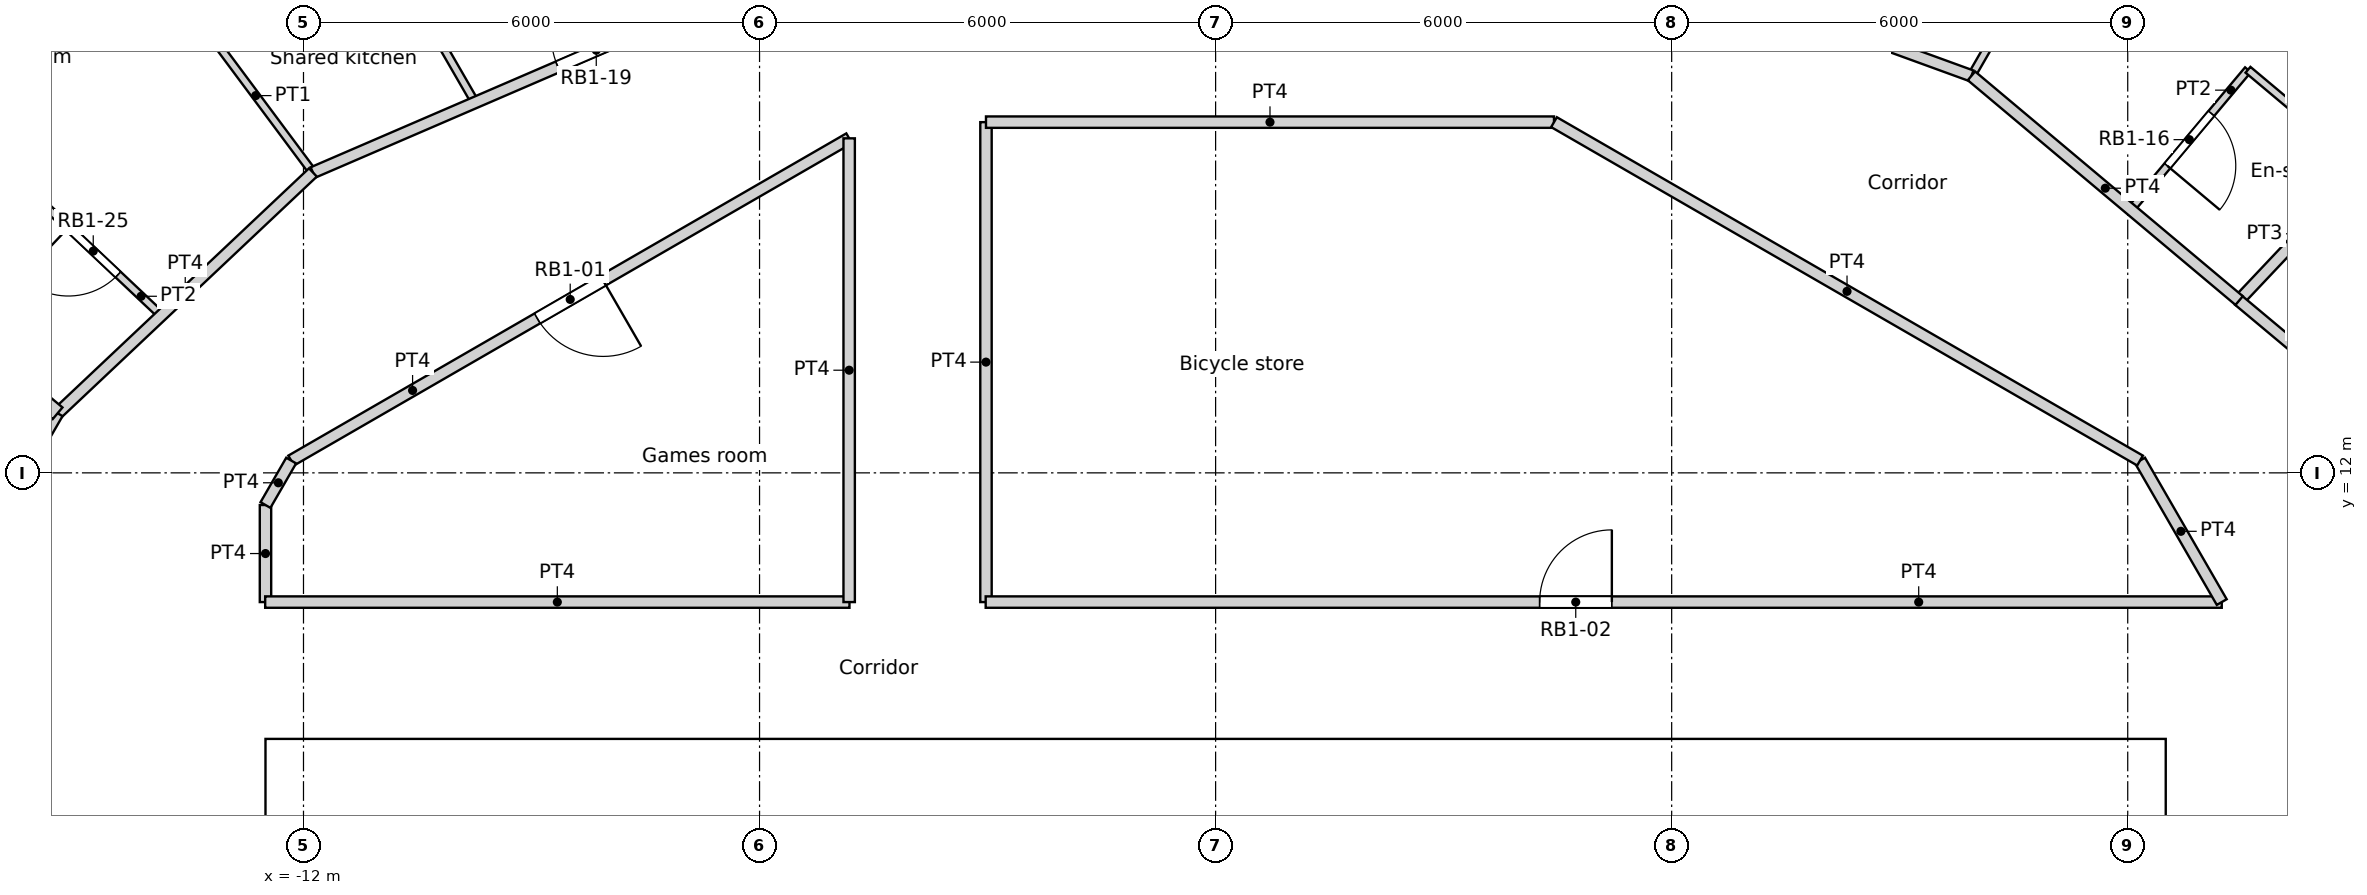
"""IFC4 building model, lengths in metres.
Left out: names, types, materials, properties, quantities, classifications, styles, units other than length and angle.
Written with IfcOpenShell. Run it as: python <this file> out.ifc"""

import sys

from ifc_helpers import new_model, si_unit, direction, frame, frame_2d, origin, origin_2d, place, context, subcontext, project, spatial, rectangle, circle, extrude, element, fill, save


model = new_model("IFC4")
c1 = context("Model", 3, precision=1e-05, world=origin(), true_north=direction((0.0, 1.0)))
c2 = subcontext(c1, "Body", "Model", "MODEL_VIEW")
j1 = project(units=[si_unit("LENGTHUNIT", "METRE"), si_unit("PLANEANGLEUNIT", "RADIAN")], contexts=[c1])
p1 = place(None, origin())
s1 = spatial("IfcSite", under=j1, at=p1, CompositionType="ELEMENT")
p2 = place(p1, origin())
s2 = spatial("IfcBuilding", under=s1, at=p2, CompositionType="ELEMENT")
p3 = place(p2, frame((0.0, 0.0, 126.0)))
s3 = spatial("IfcBuildingStorey", under=s2, at=p3, CompositionType="ELEMENT", Elevation=126.0)
for number, where, z_axis, x_axis in (
    (1, (11.735, 14.716, 0.0), (0.0, 0.0, 1.0), (1.0, 0.0, 0.0)),
    (2, (6.876, 17.521, 0.0), (0.0, 0.0, 1.0), (1.0, 0.0, 0.0)),
    (3, (-9.411, 16.301, 0.0), (0.0, 0.0, 1.0), (1.0, 0.0, 0.0)),
    (4, (-13.798, 12.802, 0.0), (0.0, 0.0, 1.0), (1.0, 0.0, 0.0)),
):
    element("IfcColumn", number, at=place(p3, frame(where, z_axis=z_axis, x_axis=x_axis)), inside=s3, PredefinedType="COLUMN", context=c2, shape_type="SweptSolid", body=[
        extrude(circle(Radius=0.65, at=origin_2d()), origin(), (0.0, 0.0, 1.0), 3.6),
    ])
p4 = place(p3, frame((-12.5, 8.05, 0.0), z_axis=(0.0, 0.0, 1.0), x_axis=(1.0, 0.0, 0.0)))
e5 = element("IfcWall", 5, at=p4, inside=s3, PredefinedType="SOLIDWALL", context=c2, shape_type="SweptSolid", body=[
    extrude(rectangle(XDim=25.0, YDim=0.9, at=frame_2d((12.5, 0.0))), origin(), (0.0, 0.0, 1.0), 3.6),
])
p5 = place(p4, frame((8.3, 0.0, 0.0)))
e6 = element("IfcOpeningElement", 6, at=p5, cuts=e5, PredefinedType="OPENING", context=c2, shape_type="SweptSolid", body=[
    extrude(rectangle(XDim=1.8, YDim=2.1, at=frame_2d((0.9, 1.05))), frame((0.0, 0.45, 0.0), z_axis=(0.0, -1.0, 0.0), x_axis=(1.0, 0.0, 0.0)), (0.0, 0.0, 1.0), 0.9),
])
p6 = place(p3, frame((-12.05, -7.6, 0.0), z_axis=(0.0, 0.0, 1.0), x_axis=(0.0, 1.0, 0.0)))
e7 = element("IfcWall", 7, at=p6, inside=s3, PredefinedType="SOLIDWALL", context=c2, shape_type="SweptSolid", body=[
    extrude(rectangle(XDim=15.2, YDim=0.9, at=frame_2d((7.6, 0.0))), origin(), (0.0, 0.0, 1.0), 3.6),
])
p7 = place(p6, frame((7.1, 0.0, 0.0)))
e8 = element("IfcOpeningElement", 8, at=p7, cuts=e7, PredefinedType="OPENING", context=c2, shape_type="SweptSolid", body=[
    extrude(rectangle(XDim=1.0, YDim=2.1, at=frame_2d((0.5, 1.05))), frame((0.0, 0.45, 0.0), z_axis=(0.0, -1.0, 0.0), x_axis=(1.0, 0.0, 0.0)), (0.0, 0.0, 1.0), 0.9),
])
p8 = place(p3, frame((12.05, -7.6, 0.0), z_axis=(0.0, 0.0, 1.0), x_axis=(0.0, 1.0, 0.0)))
e9 = element("IfcWall", 9, at=p8, inside=s3, PredefinedType="SOLIDWALL", context=c2, shape_type="SweptSolid", body=[
    extrude(rectangle(XDim=15.2, YDim=0.9, at=frame_2d((7.6, 0.0))), origin(), (0.0, 0.0, 1.0), 3.6),
])
p9 = place(p8, frame((5.1, 0.0, 0.0)))
e10 = element("IfcOpeningElement", 10, at=p9, cuts=e9, PredefinedType="OPENING", context=c2, shape_type="SweptSolid", body=[
    extrude(rectangle(XDim=1.0, YDim=2.1, at=frame_2d((0.5, 1.05))), frame((0.0, 0.45, 0.0), z_axis=(0.0, -1.0, 0.0), x_axis=(1.0, 0.0, 0.0)), (0.0, 0.0, 1.0), 0.9),
])
for number, where, z_axis, x_axis in (
    (11, (-2.25, 3.25, 0.0), (0.0, 0.0, 1.0), (0.0, 1.0, 0.0)),
    (12, (0.55, 3.25, 0.0), (0.0, 0.0, 1.0), (0.0, 1.0, 0.0)),
):
    element("IfcWall", number, at=place(p3, frame(where, z_axis=z_axis, x_axis=x_axis)), inside=s3, PredefinedType="SOLIDWALL", context=c2, shape_type="SweptSolid", body=[
        extrude(rectangle(XDim=4.35, YDim=0.3, at=frame_2d((2.175, 0.0))), origin(), (0.0, 0.0, 1.0), 3.3),
    ])
p10 = place(p3, frame((-9.05, -7.0, 0.0), z_axis=(0.0, 0.0, 1.0), x_axis=(0.0, 1.0, 0.0)))
e13 = element("IfcWall", 13, at=p10, inside=s3, PredefinedType="SOLIDWALL", context=c2, shape_type="SweptSolid", body=[
    extrude(rectangle(XDim=14.6, YDim=0.3, at=frame_2d((7.3, 0.0))), origin(), (0.0, 0.0, 1.0), 3.3),
])
p11 = place(p3, frame((-4.275, 6.7, 0.0), z_axis=(0.0, 0.0, 1.0), x_axis=(0.0, 1.0, 0.0)))
e14 = element("IfcWall", 14, at=p11, inside=s3, PredefinedType="SOLIDWALL", context=c2, shape_type="SweptSolid", body=[
    extrude(rectangle(XDim=0.9, YDim=0.15, at=frame_2d((0.45, 0.0))), origin(), (0.0, 0.0, 1.0), 3.3),
])
p12 = place(p3, frame((0.7, 7.15, 0.0), z_axis=(0.0, 0.0, 1.0), x_axis=(1.0, 0.0, 0.0)))
e15 = element("IfcWall", 15, at=p12, inside=s3, PredefinedType="SOLIDWALL", context=c2, shape_type="SweptSolid", body=[
    extrude(rectangle(XDim=8.35, YDim=0.9, at=frame_2d((4.175, 0.0))), origin(), (0.0, 0.0, 1.0), 3.3),
])
p13 = place(p3, frame((-12.504, 10.3, 0.0), z_axis=(0.0, 0.0, 1.0), x_axis=(1.0, 0.0, 0.0)))
e16 = element("IfcWall", 16, at=p13, inside=s3, PredefinedType="PARTITIONING", context=c2, shape_type="SweptSolid", body=[
    extrude(rectangle(XDim=7.687, YDim=0.15, at=frame_2d((3.844, 0.0))), origin(), (0.0, 0.0, 1.0), 3.3),
])
p14 = place(p3, frame((-3.025, 10.3, 0.0), z_axis=(0.0, 0.0, 1.0), x_axis=(1.0, 0.0, 0.0)))
e17 = element("IfcWall", 17, at=p14, inside=s3, PredefinedType="PARTITIONING", context=c2, shape_type="SweptSolid", body=[
    extrude(rectangle(XDim=16.262, YDim=0.15, at=frame_2d((8.131, 0.0))), origin(), (0.0, 0.0, 1.0), 3.3),
])
p15 = place(p14, frame((7.288, 0.0, 0.0)))
e18 = element("IfcOpeningElement", 18, at=p15, cuts=e17, PredefinedType="OPENING", context=c2, shape_type="SweptSolid", body=[
    extrude(rectangle(XDim=0.95, YDim=2.1, at=frame_2d((0.475, 1.05))), frame((0.0, 0.075, 0.0), z_axis=(0.0, -1.0, 0.0), x_axis=(1.0, 0.0, 0.0)), (0.0, 0.0, 1.0), 0.15),
])
p16 = place(p3, frame((12.162, 12.162, 0.0), z_axis=(0.0, 0.0, 1.0), x_axis=(0.499961633463, -0.866047553582, 0.0)))
e19 = element("IfcWall", 19, at=p16, inside=s3, PredefinedType="PARTITIONING", context=c2, shape_type="SweptSolid", body=[
    extrude(rectangle(XDim=2.15, YDim=0.15, at=frame_2d((1.075, 0.0))), origin(), (0.0, 0.0, 1.0), 3.3),
])
p17 = place(p3, frame((13.458, 14.27, 0.0), z_axis=(0.0, 0.0, 1.0), x_axis=(0.767079699321, -0.641551817775, 0.0)))
e20 = element("IfcWall", 20, at=p17, inside=s3, PredefinedType="PARTITIONING", context=c2, shape_type="SweptSolid", body=[
    extrude(rectangle(XDim=2.316, YDim=0.15, at=frame_2d((1.158, 0.0))), origin(), (0.0, 0.0, 1.0), 3.3),
])
p18 = place(p3, frame((-4.821, 10.3, 0.0), z_axis=(0.0, 0.0, 1.0), x_axis=(0.0, 1.0, 0.0)))
e21 = element("IfcWall", 21, at=p18, inside=s3, PredefinedType="PARTITIONING", context=c2, shape_type="SweptSolid", body=[
    extrude(rectangle(XDim=6.101, YDim=0.15, at=frame_2d((3.05, 0.0))), origin(), (0.0, 0.0, 1.0), 3.3),
])
p19 = place(p3, frame((-12.162, 12.162, 0.0), z_axis=(0.0, 0.0, 1.0), x_axis=(0.866004766557, 0.500035743023, 0.0)))
e22 = element("IfcWall", 22, at=p19, inside=s3, PredefinedType="PARTITIONING", context=c2, shape_type="SweptSolid", body=[
    extrude(rectangle(XDim=8.477, YDim=0.15, at=frame_2d((4.239, 0.0))), origin(), (0.0, 0.0, 1.0), 3.3),
])
p20 = place(p19, frame((3.739, 0.0, 0.0)))
e23 = element("IfcOpeningElement", 23, at=p20, cuts=e22, PredefinedType="OPENING", context=c2, shape_type="SweptSolid", body=[
    extrude(rectangle(XDim=1.0, YDim=2.04, at=frame_2d((0.5, 1.02))), frame((0.0, 0.075, 0.0), z_axis=(0.0, -1.0, 0.0), x_axis=(1.0, 0.0, 0.0)), (0.0, 0.0, 1.0), 0.15),
])
p21 = place(p3, frame((4.452, 16.614, 0.0), z_axis=(0.0, 0.0, 1.0), x_axis=(0.866005203721, -0.500034985904, 0.0)))
e24 = element("IfcWall", 24, at=p21, inside=s3, PredefinedType="PARTITIONING", context=c2, shape_type="SweptSolid", body=[
    extrude(rectangle(XDim=8.903, YDim=0.15, at=frame_2d((4.452, 0.0))), origin(), (0.0, 0.0, 1.0), 3.3),
])
p22 = place(p3, frame((-3.021, 16.614, 0.0), z_axis=(0.0, 0.0, 1.0), x_axis=(1.0, 0.0, 0.0)))
e25 = element("IfcWall", 25, at=p22, inside=s3, PredefinedType="PARTITIONING", context=c2, shape_type="SweptSolid", body=[
    extrude(rectangle(XDim=7.473, YDim=0.15, at=frame_2d((3.736, 0.0))), origin(), (0.0, 0.0, 1.0), 3.3),
])
p23 = place(p3, frame((-3.021, 10.3, 0.0), z_axis=(0.0, 0.0, 1.0), x_axis=(0.0, 1.0, 0.0)))
e26 = element("IfcWall", 26, at=p23, inside=s3, PredefinedType="PARTITIONING", context=c2, shape_type="SweptSolid", body=[
    extrude(rectangle(XDim=6.314, YDim=0.15, at=frame_2d((3.157, 0.0))), origin(), (0.0, 0.0, 1.0), 3.3),
])
p24 = place(p3, frame((3.453, 19.586, 0.0), z_axis=(0.0, 0.0, 1.0), x_axis=(0.939706711967, -0.341981425643, 0.0)))
e27 = element("IfcWall", 27, at=p24, inside=s3, PredefinedType="PARTITIONING", context=c2, shape_type="SweptSolid", body=[
    extrude(rectangle(XDim=6.908, YDim=0.15, at=frame_2d((3.454, 0.0))), origin(), (0.0, 0.0, 1.0), 3.3),
])
p25 = place(p24, frame((0.608, 0.0, 0.0)))
e28 = element("IfcOpeningElement", 28, at=p25, cuts=e27, PredefinedType="OPENING", context=c2, shape_type="SweptSolid", body=[
    extrude(rectangle(XDim=1.1, YDim=2.1, at=frame_2d((0.55, 1.05))), frame((0.0, 0.075, 0.0), z_axis=(0.0, -1.0, 0.0), x_axis=(1.0, 0.0, 0.0)), (0.0, 0.0, 1.0), 0.15),
])
p26 = place(p3, frame((9.944, 17.223, 0.0), z_axis=(0.0, 0.0, 1.0), x_axis=(0.765940168638, -0.642911858708, 0.0)))
e29 = element("IfcWall", 29, at=p26, inside=s3, PredefinedType="PARTITIONING", context=c2, shape_type="SweptSolid", body=[
    extrude(rectangle(XDim=4.598, YDim=0.15, at=frame_2d((2.299, 0.0))), origin(), (0.0, 0.0, 1.0), 3.3),
])
p27 = place(p3, frame((-11.876, 15.952, 0.0), z_axis=(0.0, 0.0, 1.0), x_axis=(0.918189765505, 0.396140826629, 0.0)))
e30 = element("IfcWall", 30, at=p27, inside=s3, PredefinedType="PARTITIONING", context=c2, shape_type="SweptSolid", body=[
    extrude(rectangle(XDim=9.174, YDim=0.15, at=frame_2d((4.587, 0.0))), origin(), (0.0, 0.0, 1.0), 3.3),
])
p28 = place(p27, frame((3.51, 0.0, 0.0)))
e31 = element("IfcOpeningElement", 31, at=p28, cuts=e30, PredefinedType="OPENING", context=c2, shape_type="SweptSolid", body=[
    extrude(rectangle(XDim=1.1, YDim=2.1, at=frame_2d((0.55, 1.05))), frame((0.0, 0.075, 0.0), z_axis=(0.0, -1.0, 0.0), x_axis=(1.0, 0.0, 0.0)), (0.0, 0.0, 1.0), 0.15),
])
p29 = place(p3, frame((-15.235, 12.784, 0.0), z_axis=(0.0, 0.0, 1.0), x_axis=(0.7275818654, 0.686020866403, 0.0)))
e32 = element("IfcWall", 32, at=p29, inside=s3, PredefinedType="PARTITIONING", context=c2, shape_type="SweptSolid", body=[
    extrude(rectangle(XDim=4.617, YDim=0.15, at=frame_2d((2.309, 0.0))), origin(), (0.0, 0.0, 1.0), 3.3),
])
p30 = place(p3, frame((-12.5, 11.577, 0.0), z_axis=(0.0, 0.0, 1.0), x_axis=(0.500024767483, 0.866011103799, 0.0)))
e33 = element("IfcWall", 33, at=p30, inside=s3, PredefinedType="PARTITIONING", context=c2, shape_type="SweptSolid", body=[
    extrude(rectangle(XDim=0.676, YDim=0.15, at=frame_2d((0.338, 0.0))), origin(), (0.0, 0.0, 1.0), 3.3),
])
p31 = place(p3, frame((-12.5, 10.3, 0.0), z_axis=(0.0, 0.0, 1.0), x_axis=(0.0, 1.0, 0.0)))
e34 = element("IfcWall", 34, at=p31, inside=s3, PredefinedType="PARTITIONING", context=c2, shape_type="SweptSolid", body=[
    extrude(rectangle(XDim=1.277, YDim=0.15, at=frame_2d((0.638, 0.0))), origin(), (0.0, 0.0, 1.0), 3.3),
])
p32 = place(p3, frame((-18.688, 6.802, 0.0), z_axis=(0.0, 0.0, 1.0), x_axis=(0.499914202267, 0.866074933462, 0.0)))
e35 = element("IfcWall", 35, at=p32, inside=s3, PredefinedType="PARTITIONING", context=c2, shape_type="SweptSolid", body=[
    extrude(rectangle(XDim=6.907, YDim=0.15, at=frame_2d((3.454, 0.0))), origin(), (0.0, 0.0, 1.0), 3.3),
])
p33 = place(p32, frame((3.004, 0.0, 0.0)))
e36 = element("IfcOpeningElement", 36, at=p33, cuts=e35, PredefinedType="OPENING", context=c2, shape_type="SweptSolid", body=[
    extrude(rectangle(XDim=1.5, YDim=2.1, at=frame_2d((0.75, 1.05))), frame((0.0, 0.075, 0.0), z_axis=(0.0, -1.0, 0.0), x_axis=(1.0, 0.0, 0.0)), (0.0, 0.0, 1.0), 0.15),
])
p34 = place(p3, frame((13.463, 14.27, 0.0), z_axis=(0.0, 0.0, 1.0), x_axis=(0.686486574862, 0.727142477465, 0.0)))
e37 = element("IfcWall", 37, at=p34, inside=s3, PredefinedType="PARTITIONING", context=c2, shape_type="SweptSolid", body=[
    extrude(rectangle(XDim=2.408, YDim=0.15, at=frame_2d((1.204, 0.0))), origin(), (0.0, 0.0, 1.0), 3.3),
])
p35 = place(p3, frame((9.944, 17.223, 0.0), z_axis=(0.0, 0.0, 1.0), x_axis=(0.499861334108, 0.866105447774, 0.0)))
e38 = element("IfcWall", 38, at=p35, inside=s3, PredefinedType="PARTITIONING", context=c2, shape_type="SweptSolid", body=[
    extrude(rectangle(XDim=2.13, YDim=0.1, at=frame_2d((1.065, 0.0))), origin(), (0.0, 0.0, 1.0), 3.3),
])
p36 = place(p3, frame((13.582, 17.303, 0.0), z_axis=(0.0, 0.0, 1.0), x_axis=(0.766224532916, -0.642572925945, 0.0)))
e39 = element("IfcWall", 39, at=p36, inside=s3, PredefinedType="PARTITIONING", context=c2, shape_type="SweptSolid", body=[
    extrude(rectangle(XDim=1.998, YDim=0.1, at=frame_2d((0.999, 0.0))), origin(), (0.0, 0.0, 1.0), 3.3),
])
p37 = place(p3, frame((12.04, 15.465, 0.0), z_axis=(0.0, 0.0, 1.0), x_axis=(0.642743296644, 0.766081623993, 0.0)))
e40 = element("IfcWall", 40, at=p37, inside=s3, PredefinedType="PARTITIONING", context=c2, shape_type="SweptSolid", body=[
    extrude(rectangle(XDim=2.399, YDim=0.1, at=frame_2d((1.2, 0.0))), origin(), (0.0, 0.0, 1.0), 3.3),
])
p38 = place(p37, frame((0.749, 0.0, 0.0)))
e41 = element("IfcOpeningElement", 41, at=p38, cuts=e40, PredefinedType="OPENING", context=c2, shape_type="SweptSolid", body=[
    extrude(rectangle(XDim=0.9, YDim=2.04, at=frame_2d((0.45, 1.02))), frame((0.0, 0.05, 0.0), z_axis=(0.0, -1.0, 0.0), x_axis=(1.0, 0.0, 0.0)), (0.0, 0.0, 1.0), 0.1),
])
p39 = place(p3, frame((-12.749, 22.081, 0.0), z_axis=(0.0, 0.0, 1.0), x_axis=(0.50002935287, -0.866008456234, 0.0)))
e42 = element("IfcWall", 42, at=p39, inside=s3, PredefinedType="PARTITIONING", context=c2, shape_type="SweptSolid", body=[
    extrude(rectangle(XDim=6.014, YDim=0.1, at=frame_2d((3.007, 0.0))), origin(), (0.0, 0.0, 1.0), 3.3),
])
p40 = place(p39, frame((2.507, 0.0, 0.0)))
e43 = element("IfcOpeningElement", 43, at=p40, cuts=e42, PredefinedType="OPENING", context=c2, shape_type="SweptSolid", body=[
    extrude(rectangle(XDim=1.0, YDim=2.04, at=frame_2d((0.5, 1.02))), frame((0.0, 0.05, 0.0), z_axis=(0.0, -1.0, 0.0), x_axis=(1.0, 0.0, 0.0)), (0.0, 0.0, 1.0), 0.1),
])
p41 = place(p3, frame((-15.226, 20.452, 0.0), z_axis=(0.0, 0.0, 1.0), x_axis=(0.597155355437, -0.802125602056, 0.0)))
e44 = element("IfcWall", 44, at=p41, inside=s3, PredefinedType="PARTITIONING", context=c2, shape_type="SweptSolid", body=[
    extrude(rectangle(XDim=5.61, YDim=0.1, at=frame_2d((2.805, 0.0))), origin(), (0.0, 0.0, 1.0), 3.3),
])
p42 = place(p41, frame((2.139, 0.0, 0.0)))
e45 = element("IfcOpeningElement", 45, at=p42, cuts=e44, PredefinedType="OPENING", context=c2, shape_type="SweptSolid", body=[
    extrude(rectangle(XDim=0.9, YDim=2.1, at=frame_2d((0.45, 1.05))), frame((0.0, 0.05, 0.0), z_axis=(0.0, -1.0, 0.0), x_axis=(1.0, 0.0, 0.0)), (0.0, 0.0, 1.0), 0.1),
])
p43 = place(p3, frame((-15.662, 15.763, 0.0), z_axis=(0.0, 0.0, 1.0), x_axis=(0.727320856717, -0.686297582237, 0.0)))
e46 = element("IfcWall", 46, at=p43, inside=s3, PredefinedType="PARTITIONING", context=c2, shape_type="SweptSolid", body=[
    extrude(rectangle(XDim=2.464, YDim=0.1, at=frame_2d((1.232, 0.0))), origin(), (0.0, 0.0, 1.0), 3.3),
])
p44 = place(p43, frame((0.782, 0.0, 0.0)))
e47 = element("IfcOpeningElement", 47, at=p44, cuts=e46, PredefinedType="OPENING", context=c2, shape_type="SweptSolid", body=[
    extrude(rectangle(XDim=0.9, YDim=2.04, at=frame_2d((0.45, 1.02))), frame((0.0, 0.05, 0.0), z_axis=(0.0, -1.0, 0.0), x_axis=(1.0, 0.0, 0.0)), (0.0, 0.0, 1.0), 0.1),
])
p45 = place(p3, frame((-19.532, 16.389, 0.0), z_axis=(0.0, 0.0, 1.0), x_axis=(0.76609059793, -0.642732600514, 0.0)))
e48 = element("IfcWall", 48, at=p45, inside=s3, PredefinedType="PARTITIONING", context=c2, shape_type="SweptSolid", body=[
    extrude(rectangle(XDim=5.609, YDim=0.2, at=frame_2d((2.804, 0.0))), origin(), (0.0, 0.0, 1.0), 3.3),
])
p46 = place(p5, origin())
e49 = element("IfcDoor", 49, at=p46, inside=s3, OperationType="DOUBLE_DOOR_SINGLE_SWING", PredefinedType="DOOR", context=c2, shape_type="SweptSolid", body=[
    extrude(rectangle(XDim=1.8, YDim=2.1, at=frame_2d((0.9, 1.05))), frame((0.0, 0.025, 0.0), z_axis=(0.0, -1.0, 0.0), x_axis=(1.0, 0.0, 0.0)), (0.0, 0.0, 1.0), 0.05),
])
fill(e6, e49)
p47 = place(p20, origin())
e50 = element("IfcDoor", 50, at=p47, inside=s3, OperationType="SINGLE_SWING_LEFT", PredefinedType="DOOR", context=c2, shape_type="SweptSolid", body=[
    extrude(rectangle(XDim=1.0, YDim=2.04, at=frame_2d((0.5, 1.02))), frame((0.0, 0.025, 0.0), z_axis=(0.0, -1.0, 0.0), x_axis=(1.0, 0.0, 0.0)), (0.0, 0.0, 1.0), 0.05),
])
fill(e23, e50)
p48 = place(p15, origin())
e51 = element("IfcDoor", 51, at=p48, inside=s3, OperationType="SINGLE_SWING_RIGHT", PredefinedType="DOOR", context=c2, shape_type="SweptSolid", body=[
    extrude(rectangle(XDim=0.95, YDim=2.1, at=frame_2d((0.475, 1.05))), frame((0.0, 0.025, 0.0), z_axis=(0.0, -1.0, 0.0), x_axis=(1.0, 0.0, 0.0)), (0.0, 0.0, 1.0), 0.05),
])
fill(e18, e51)
p49 = place(p38, origin())
e52 = element("IfcDoor", 52, at=p49, inside=s3, OperationType="SINGLE_SWING_RIGHT", PredefinedType="DOOR", context=c2, shape_type="SweptSolid", body=[
    extrude(rectangle(XDim=0.9, YDim=2.04, at=frame_2d((0.45, 1.02))), frame((0.0, 0.025, 0.0), z_axis=(0.0, -1.0, 0.0), x_axis=(1.0, 0.0, 0.0)), (0.0, 0.0, 1.0), 0.05),
])
fill(e41, e52)
p50 = place(p28, origin())
e53 = element("IfcDoor", 53, at=p50, inside=s3, OperationType="SINGLE_SWING_RIGHT", PredefinedType="DOOR", context=c2, shape_type="SweptSolid", body=[
    extrude(rectangle(XDim=1.1, YDim=2.1, at=frame_2d((0.55, 1.05))), frame((0.0, 0.025, 0.0), z_axis=(0.0, -1.0, 0.0), x_axis=(1.0, 0.0, 0.0)), (0.0, 0.0, 1.0), 0.05),
])
fill(e31, e53)
p51 = place(p44, origin())
e54 = element("IfcDoor", 54, at=p51, inside=s3, OperationType="SINGLE_SWING_RIGHT", PredefinedType="DOOR", context=c2, shape_type="SweptSolid", body=[
    extrude(rectangle(XDim=0.9, YDim=2.04, at=frame_2d((0.45, 1.02))), frame((0.0, 0.025, 0.0), z_axis=(0.0, -1.0, 0.0), x_axis=(1.0, 0.0, 0.0)), (0.0, 0.0, 1.0), 0.05),
])
fill(e47, e54)
save(model, sys.argv[1])
